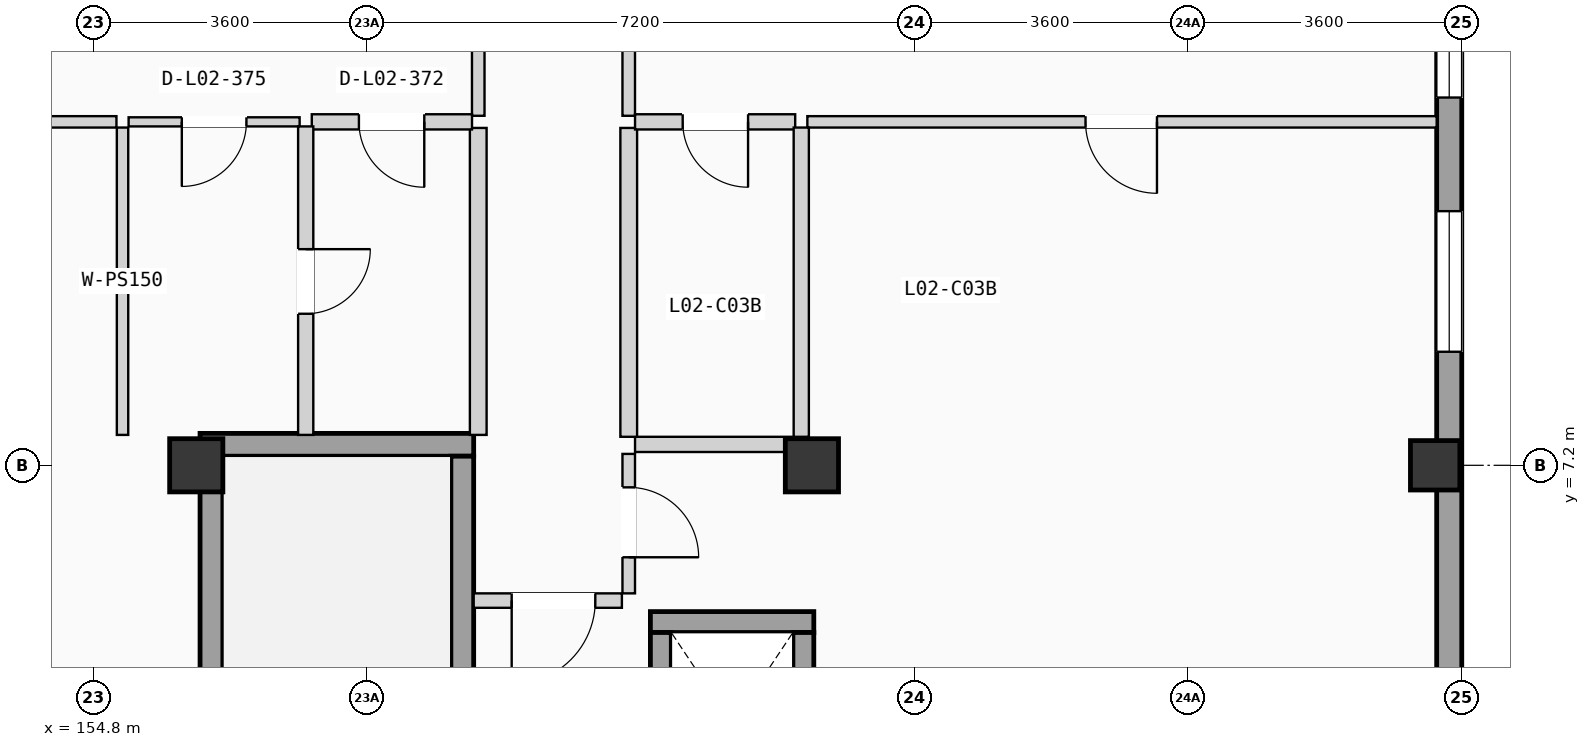
"""IFC4 building model, lengths in metres.
Left out: names, types, materials, properties, quantities, classifications, styles, units other than length and angle.
Written with IfcOpenShell. Run it as: python <this file> out.ifc"""

import sys

from ifc_helpers import new_model, si_unit, direction, frame, frame_2d, origin, origin_2d, place, context, subcontext, project, spatial, rectangle, extrude, element, fill, save


model = new_model("IFC4")
c1 = context("Model", 3, precision=1e-05, world=origin(), true_north=direction((0.0, 1.0)))
c2 = subcontext(c1, "Body", "Model", "MODEL_VIEW")
j1 = project(units=[si_unit("LENGTHUNIT", "METRE"), si_unit("PLANEANGLEUNIT", "RADIAN")], contexts=[c1])
p1 = place(None, origin())
s1 = spatial("IfcSite", under=j1, at=p1, CompositionType="ELEMENT")
p2 = place(p1, origin())
s2 = spatial("IfcBuilding", under=s1, at=p2, CompositionType="ELEMENT")
p3 = place(p2, frame((0.0, 0.0, 8.575)))
s3 = spatial("IfcBuildingStorey", under=s2, at=p3, CompositionType="ELEMENT", Elevation=8.575)
for number, where, z_axis, x_axis in (
    (1, (156.15, 7.2, 0.0), (0.0, 0.0, 1.0), (1.0, 0.0, 0.0)),
    (2, (164.25, 7.2, 0.0), (0.0, 0.0, 1.0), (1.0, 0.0, 0.0)),
):
    element("IfcColumn", number, at=place(p3, frame(where, z_axis=z_axis, x_axis=x_axis)), inside=s3, PredefinedType="COLUMN", context=c2, shape_type="SweptSolid", body=[
        extrude(rectangle(XDim=0.7, YDim=0.7, at=origin_2d()), origin(), (0.0, 0.0, 1.0), 3.5),
    ])
p4 = place(p3, frame((172.45, 7.2, 0.0), z_axis=(0.0, 0.0, 1.0), x_axis=(1.0, 0.0, 0.0)))
e3 = element("IfcColumn", 3, at=p4, inside=s3, PredefinedType="COLUMN", context=c2, shape_type="SweptSolid", body=[
    extrude(rectangle(XDim=0.65, YDim=0.65, at=origin_2d()), origin(), (0.0, 0.0, 1.0), 3.5),
])
p5 = place(p3, frame((172.635, 0.33, 0.0), z_axis=(0.0, 0.0, 1.0), x_axis=(0.0, 1.0, 0.0)))
e4 = element("IfcWall", 4, at=p5, inside=s3, PredefinedType="SOLIDWALL", context=c2, shape_type="SweptSolid", body=[
    extrude(rectangle(XDim=49.74, YDim=0.33, at=frame_2d((24.87, 0.0))), origin(), (0.0, 0.0, 1.0), 3.24),
])
p6 = place(p5, frame((11.709, 0.0, 0.9)))
e5 = element("IfcOpeningElement", 5, at=p6, cuts=e4, PredefinedType="OPENING", context=c2, shape_type="SweptSolid", body=[
    extrude(rectangle(XDim=1.85, YDim=1.2, at=frame_2d((0.925, 0.6))), frame((0.0, 0.175, 0.0), z_axis=(0.0, -1.0, 0.0), x_axis=(1.0, 0.0, 0.0)), (0.0, 0.0, 1.0), 0.35),
])
p7 = place(p5, frame((8.364, 0.0, 0.9)))
e6 = element("IfcOpeningElement", 6, at=p7, cuts=e4, PredefinedType="OPENING", context=c2, shape_type="SweptSolid", body=[
    extrude(rectangle(XDim=1.85, YDim=1.35, at=frame_2d((0.925, 0.675))), frame((0.0, 0.175, 0.0), z_axis=(0.0, -1.0, 0.0), x_axis=(1.0, 0.0, 0.0)), (0.0, 0.0, 1.0), 0.35),
])
p8 = place(p5, frame((17.612, 0.0, 0.9)))
e7 = element("IfcOpeningElement", 7, at=p8, cuts=e4, PredefinedType="OPENING", context=c2, shape_type="SweptSolid", body=[
    extrude(rectangle(XDim=1.85, YDim=1.5, at=frame_2d((0.925, 0.75))), frame((0.0, 0.175, 0.0), z_axis=(0.0, -1.0, 0.0), x_axis=(1.0, 0.0, 0.0)), (0.0, 0.0, 1.0), 0.35),
])
p9 = place(p5, frame((31.145, 0.0, 0.9)))
e8 = element("IfcOpeningElement", 8, at=p9, cuts=e4, PredefinedType="OPENING", context=c2, shape_type="SweptSolid", body=[
    extrude(rectangle(XDim=1.85, YDim=1.65, at=frame_2d((0.925, 0.825))), frame((0.0, 0.175, 0.0), z_axis=(0.0, -1.0, 0.0), x_axis=(1.0, 0.0, 0.0)), (0.0, 0.0, 1.0), 0.35),
])
p10 = place(p5, frame((23.945, 0.0, 0.755)))
e9 = element("IfcOpeningElement", 9, at=p10, cuts=e4, PredefinedType="OPENING", context=c2, shape_type="SweptSolid", body=[
    extrude(rectangle(XDim=1.85, YDim=1.8, at=frame_2d((0.925, 0.9))), frame((0.0, 0.175, 0.0), z_axis=(0.0, -1.0, 0.0), x_axis=(1.0, 0.0, 0.0)), (0.0, 0.0, 1.0), 0.35),
])
p11 = place(p5, frame((38.205, 0.0, 0.9)))
e10 = element("IfcOpeningElement", 10, at=p11, cuts=e4, PredefinedType="OPENING", context=c2, shape_type="SweptSolid", body=[
    extrude(rectangle(XDim=2.0, YDim=1.2, at=frame_2d((1.0, 0.6))), frame((0.0, 0.175, 0.0), z_axis=(0.0, -1.0, 0.0), x_axis=(1.0, 0.0, 0.0)), (0.0, 0.0, 1.0), 0.35),
])
p12 = place(p3, frame((156.2, 7.47, 0.0), z_axis=(0.0, 0.0, 1.0), x_axis=(1.0, 0.0, 0.0)))
e11 = element("IfcWall", 11, at=p12, inside=s3, PredefinedType="SHEAR", context=c2, shape_type="SweptSolid", body=[
    extrude(rectangle(XDim=3.6, YDim=0.3, at=frame_2d((1.8, 0.0))), origin(), (0.0, 0.0, 1.0), 3.24),
])
p13 = place(p3, frame((156.35, 0.32, 0.0), z_axis=(0.0, 0.0, 1.0), x_axis=(0.0, 1.0, 0.0)))
e12 = element("IfcWall", 12, at=p13, inside=s3, PredefinedType="SHEAR", context=c2, shape_type="SweptSolid", body=[
    extrude(rectangle(XDim=7.0, YDim=0.3, at=frame_2d((3.5, 0.0))), origin(), (0.0, 0.0, 1.0), 3.24),
])
p14 = place(p3, frame((159.65, 0.32, 0.0), z_axis=(0.0, 0.0, 1.0), x_axis=(0.0, 1.0, 0.0)))
e13 = element("IfcWall", 13, at=p14, inside=s3, PredefinedType="SHEAR", context=c2, shape_type="SweptSolid", body=[
    extrude(rectangle(XDim=7.0, YDim=0.3, at=frame_2d((3.5, 0.0))), origin(), (0.0, 0.0, 1.0), 3.24),
])
p15 = place(p14, frame((0.225, 0.0, 0.0)))
e14 = element("IfcOpeningElement", 14, at=p15, cuts=e13, PredefinedType="OPENING", context=c2, shape_type="SweptSolid", body=[
    extrude(rectangle(XDim=1.15, YDim=2.12, at=frame_2d((0.575, 1.06))), frame((0.0, 0.16, 0.0), z_axis=(0.0, -1.0, 0.0), x_axis=(1.0, 0.0, 0.0)), (0.0, 0.0, 1.0), 0.32),
])
p16 = place(p3, frame((162.125, 5.137, 0.0), z_axis=(0.0, 0.0, 1.0), x_axis=(1.0, 0.0, 0.0)))
e15 = element("IfcWall", 15, at=p16, inside=s3, PredefinedType="SHEAR", context=c2, shape_type="SweptSolid", body=[
    extrude(rectangle(XDim=2.15, YDim=0.275, at=frame_2d((1.075, 0.0))), origin(), (0.0, 0.0, 1.0), 3.24),
])
p17 = place(p3, frame((162.262, 2.6, 0.0), z_axis=(0.0, 0.0, 1.0), x_axis=(0.0, 1.0, 0.0)))
e16 = element("IfcWall", 16, at=p17, inside=s3, PredefinedType="SHEAR", context=c2, shape_type="SweptSolid", body=[
    extrude(rectangle(XDim=2.4, YDim=0.275, at=frame_2d((1.2, 0.0))), origin(), (0.0, 0.0, 1.0), 3.24),
])
p18 = place(p17, frame((0.65, 0.0, 0.0)))
e17 = element("IfcOpeningElement", 17, at=p18, cuts=e16, PredefinedType="OPENING", context=c2, shape_type="SweptSolid", body=[
    extrude(rectangle(XDim=1.1, YDim=2.15, at=frame_2d((0.55, 1.075))), frame((0.0, 0.147, 0.0), z_axis=(0.0, -1.0, 0.0), x_axis=(1.0, 0.0, 0.0)), (0.0, 0.0, 1.0), 0.295),
])
p19 = place(p3, frame((164.137, 2.6, 0.0), z_axis=(0.0, 0.0, 1.0), x_axis=(0.0, 1.0, 0.0)))
e18 = element("IfcWall", 18, at=p19, inside=s3, PredefinedType="SHEAR", context=c2, shape_type="SweptSolid", body=[
    extrude(rectangle(XDim=2.4, YDim=0.275, at=frame_2d((1.2, 0.0))), origin(), (0.0, 0.0, 1.0), 3.24),
])
p20 = place(p3, frame((159.8, 5.42, 0.0), z_axis=(0.0, 0.0, 1.0), x_axis=(1.0, 0.0, 0.0)))
e19 = element("IfcWall", 19, at=p20, inside=s3, PredefinedType="PARTITIONING", context=c2, shape_type="SweptSolid", body=[
    extrude(rectangle(XDim=1.95, YDim=0.19, at=frame_2d((0.975, 0.0))), origin(), (0.0, 0.0, 1.0), 3.22),
])
p21 = place(p20, frame((0.5, 0.0, 0.0)))
e20 = element("IfcOpeningElement", 20, at=p21, cuts=e19, PredefinedType="OPENING", context=c2, shape_type="SweptSolid", body=[
    extrude(rectangle(XDim=1.1, YDim=2.12, at=frame_2d((0.55, 1.06))), frame((0.0, 0.105, 0.0), z_axis=(0.0, -1.0, 0.0), x_axis=(1.0, 0.0, 0.0)), (0.0, 0.0, 1.0), 0.21),
])
p22 = place(p3, frame((161.84, 5.515, 0.0), z_axis=(0.0, 0.0, 1.0), x_axis=(0.0, 1.0, 0.0)))
e21 = element("IfcWall", 21, at=p22, inside=s3, PredefinedType="PARTITIONING", context=c2, shape_type="SweptSolid", body=[
    extrude(rectangle(XDim=1.835, YDim=0.165, at=frame_2d((0.917, 0.0))), origin(), (0.0, 0.0, 1.0), 3.22),
])
p23 = place(p22, frame((0.475, 0.0, 0.0)))
e22 = element("IfcOpeningElement", 22, at=p23, cuts=e21, PredefinedType="OPENING", context=c2, shape_type="SweptSolid", body=[
    extrude(rectangle(XDim=0.92, YDim=2.04, at=frame_2d((0.46, 1.02))), frame((0.0, 0.093, 0.0), z_axis=(0.0, -1.0, 0.0), x_axis=(1.0, 0.0, 0.0)), (0.0, 0.0, 1.0), 0.185),
])
p24 = place(p3, frame((161.923, 7.475, 0.0), z_axis=(0.0, 0.0, 1.0), x_axis=(1.0, 0.0, 0.0)))
e23 = element("IfcWall", 23, at=p24, inside=s3, PredefinedType="PLUMBINGWALL", context=c2, shape_type="SweptSolid", body=[
    extrude(rectangle(XDim=2.107, YDim=0.2, at=frame_2d((1.053, 0.0))), origin(), (0.0, 0.0, 1.0), 3.22),
])
p25 = place(p3, frame((159.86, 11.799, 0.0), z_axis=(0.0, 0.0, 1.0), x_axis=(0.0, 1.0, 0.0)))
e24 = element("IfcWall", 24, at=p25, inside=s3, PredefinedType="PARTITIONING", context=c2, shape_type="SweptSolid", body=[
    extrude(rectangle(XDim=4.888, YDim=0.165, at=frame_2d((2.444, 0.0))), origin(), (0.0, 0.0, 1.0), 3.22),
])
p26 = place(p25, frame((1.919, 0.0, 0.0)))
e25 = element("IfcOpeningElement", 25, at=p26, cuts=e24, PredefinedType="OPENING", context=c2, shape_type="SweptSolid", body=[
    extrude(rectangle(XDim=1.05, YDim=2.13, at=frame_2d((0.525, 1.065))), frame((0.0, 0.093, 0.0), z_axis=(0.0, -1.0, 0.0), x_axis=(1.0, 0.0, 0.0)), (0.0, 0.0, 1.0), 0.185),
])
p27 = place(p3, frame((159.86, 7.6, 0.0), z_axis=(0.0, 0.0, 1.0), x_axis=(0.0, 1.0, 0.0)))
e26 = element("IfcWall", 26, at=p27, inside=s3, PredefinedType="PLUMBINGWALL", context=c2, shape_type="SweptSolid", body=[
    extrude(rectangle(XDim=4.039, YDim=0.22, at=frame_2d((2.02, 0.0))), origin(), (0.0, 0.0, 1.0), 3.22),
])
p28 = place(p3, frame((161.84, 11.799, 0.0), z_axis=(0.0, 0.0, 1.0), x_axis=(0.0, 1.0, 0.0)))
e27 = element("IfcWall", 27, at=p28, inside=s3, PredefinedType="PARTITIONING", context=c2, shape_type="SweptSolid", body=[
    extrude(rectangle(XDim=4.888, YDim=0.165, at=frame_2d((2.444, 0.0))), origin(), (0.0, 0.0, 1.0), 3.22),
])
p29 = place(p28, frame((1.919, 0.0, 0.0)))
e28 = element("IfcOpeningElement", 28, at=p29, cuts=e27, PredefinedType="OPENING", context=c2, shape_type="SweptSolid", body=[
    extrude(rectangle(XDim=1.05, YDim=2.13, at=frame_2d((0.525, 1.065))), frame((0.0, 0.093, 0.0), z_axis=(0.0, -1.0, 0.0), x_axis=(1.0, 0.0, 0.0)), (0.0, 0.0, 1.0), 0.185),
])
p30 = place(p3, frame((161.84, 7.575, 0.0), z_axis=(0.0, 0.0, 1.0), x_axis=(0.0, 1.0, 0.0)))
e29 = element("IfcWall", 29, at=p30, inside=s3, PredefinedType="PLUMBINGWALL", context=c2, shape_type="SweptSolid", body=[
    extrude(rectangle(XDim=4.064, YDim=0.22, at=frame_2d((2.032, 0.0))), origin(), (0.0, 0.0, 1.0), 3.22),
])
p31 = place(p3, frame((157.67, 11.719, 0.0), z_axis=(0.0, 0.0, 1.0), x_axis=(1.0, 0.0, 0.0)))
e30 = element("IfcWall", 30, at=p31, inside=s3, PredefinedType="PLUMBINGWALL", context=c2, shape_type="SweptSolid", body=[
    extrude(rectangle(XDim=2.108, YDim=0.2, at=frame_2d((1.054, 0.0))), origin(), (0.0, 0.0, 1.0), 3.22),
])
p32 = place(p31, frame((0.62, 0.0, 0.0)))
e31 = element("IfcOpeningElement", 31, at=p32, cuts=e30, PredefinedType="OPENING", context=c2, shape_type="SweptSolid", body=[
    extrude(rectangle(XDim=0.86, YDim=2.0, at=frame_2d((0.43, 1.0))), frame((0.0, 0.11, 0.0), z_axis=(0.0, -1.0, 0.0), x_axis=(1.0, 0.0, 0.0)), (0.0, 0.0, 1.0), 0.22),
])
p33 = place(p3, frame((147.93, 11.719, 0.0), z_axis=(0.0, 0.0, 1.0), x_axis=(1.0, 0.0, 0.0)))
e32 = element("IfcWall", 32, at=p33, inside=s3, PredefinedType="PARTITIONING", context=c2, shape_type="SweptSolid", body=[
    extrude(rectangle(XDim=7.17, YDim=0.15, at=frame_2d((3.585, 0.0))), origin(), (0.0, 0.0, 1.0), 3.22),
])
p34 = place(p33, frame((3.075, 0.0, 0.0)))
e33 = element("IfcOpeningElement", 33, at=p34, cuts=e32, PredefinedType="OPENING", context=c2, shape_type="SweptSolid", body=[
    extrude(rectangle(XDim=1.04, YDim=2.08, at=frame_2d((0.52, 1.04))), frame((0.0, 0.085, 0.0), z_axis=(0.0, -1.0, 0.0), x_axis=(1.0, 0.0, 0.0)), (0.0, 0.0, 1.0), 0.17),
])
p35 = place(p3, frame((155.26, 11.719, 0.0), z_axis=(0.0, 0.0, 1.0), x_axis=(1.0, 0.0, 0.0)))
e34 = element("IfcWall", 34, at=p35, inside=s3, PredefinedType="PARTITIONING", context=c2, shape_type="SweptSolid", body=[
    extrude(rectangle(XDim=2.25, YDim=0.12, at=frame_2d((1.125, 0.0))), origin(), (0.0, 0.0, 1.0), 3.22),
])
p36 = place(p35, frame((0.7, 0.0, 0.0)))
e35 = element("IfcOpeningElement", 35, at=p36, cuts=e34, PredefinedType="OPENING", context=c2, shape_type="SweptSolid", body=[
    extrude(rectangle(XDim=0.85, YDim=2.01, at=frame_2d((0.425, 1.005))), frame((0.0, 0.07, 0.0), z_axis=(0.0, -1.0, 0.0), x_axis=(1.0, 0.0, 0.0)), (0.0, 0.0, 1.0), 0.14),
])
p37 = place(p3, frame((157.59, 7.6, 0.0), z_axis=(0.0, 0.0, 1.0), x_axis=(0.0, 1.0, 0.0)))
e36 = element("IfcWall", 36, at=p37, inside=s3, PredefinedType="PLUMBINGWALL", context=c2, shape_type="SweptSolid", body=[
    extrude(rectangle(XDim=4.059, YDim=0.2, at=frame_2d((2.029, 0.0))), origin(), (0.0, 0.0, 1.0), 3.22),
])
p38 = place(p37, frame((1.594, 0.0, 0.0)))
e37 = element("IfcOpeningElement", 37, at=p38, cuts=e36, PredefinedType="OPENING", context=c2, shape_type="SweptSolid", body=[
    extrude(rectangle(XDim=0.85, YDim=2.01, at=frame_2d((0.425, 1.005))), frame((0.0, 0.11, 0.0), z_axis=(0.0, -1.0, 0.0), x_axis=(1.0, 0.0, 0.0)), (0.0, 0.0, 1.0), 0.22),
])
p39 = place(p3, frame((155.18, 7.6, 0.0), z_axis=(0.0, 0.0, 1.0), x_axis=(0.0, 1.0, 0.0)))
e38 = element("IfcWall", 38, at=p39, inside=s3, PredefinedType="PARTITIONING", context=c2, shape_type="SweptSolid", body=[
    extrude(rectangle(XDim=4.044, YDim=0.15, at=frame_2d((2.022, 0.0))), origin(), (0.0, 0.0, 1.0), 3.22),
])
p40 = place(p3, frame((161.923, 11.719, 0.0), z_axis=(0.0, 0.0, 1.0), x_axis=(1.0, 0.0, 0.0)))
e39 = element("IfcWall", 39, at=p40, inside=s3, PredefinedType="PLUMBINGWALL", context=c2, shape_type="SweptSolid", body=[
    extrude(rectangle(XDim=2.107, YDim=0.2, at=frame_2d((1.053, 0.0))), origin(), (0.0, 0.0, 1.0), 3.22),
])
p41 = place(p40, frame((0.627, 0.0, 0.0)))
e40 = element("IfcOpeningElement", 40, at=p41, cuts=e39, PredefinedType="OPENING", context=c2, shape_type="SweptSolid", body=[
    extrude(rectangle(XDim=0.86, YDim=2.0, at=frame_2d((0.43, 1.0))), frame((0.0, 0.11, 0.0), z_axis=(0.0, -1.0, 0.0), x_axis=(1.0, 0.0, 0.0)), (0.0, 0.0, 1.0), 0.22),
])
p42 = place(p3, frame((164.19, 11.719, 0.0), z_axis=(0.0, 0.0, 1.0), x_axis=(1.0, 0.0, 0.0)))
e41 = element("IfcWall", 41, at=p42, inside=s3, PredefinedType="PARTITIONING", context=c2, shape_type="SweptSolid", body=[
    extrude(rectangle(XDim=8.28, YDim=0.15, at=frame_2d((4.14, 0.0))), origin(), (0.0, 0.0, 1.0), 3.22),
])
p43 = place(p42, frame((3.66, 0.0, 0.0)))
e42 = element("IfcOpeningElement", 42, at=p43, cuts=e41, PredefinedType="OPENING", context=c2, shape_type="SweptSolid", body=[
    extrude(rectangle(XDim=0.94, YDim=2.06, at=frame_2d((0.47, 1.03))), frame((0.0, 0.085, 0.0), z_axis=(0.0, -1.0, 0.0), x_axis=(1.0, 0.0, 0.0)), (0.0, 0.0, 1.0), 0.17),
])
p44 = place(p3, frame((164.11, 7.575, 0.0), z_axis=(0.0, 0.0, 1.0), x_axis=(0.0, 1.0, 0.0)))
e43 = element("IfcWall", 43, at=p44, inside=s3, PredefinedType="PLUMBINGWALL", context=c2, shape_type="SweptSolid", body=[
    extrude(rectangle(XDim=4.069, YDim=0.2, at=frame_2d((2.035, 0.0))), origin(), (0.0, 0.0, 1.0), 3.22),
])
p45 = place(p6, origin())
e44 = element("IfcWindow", 44, at=p45, inside=s3, PartitioningType="DOUBLE_PANEL_VERTICAL", PredefinedType="WINDOW", context=c2, shape_type="SweptSolid", body=[
    extrude(rectangle(XDim=1.85, YDim=1.2, at=frame_2d((0.925, 0.6))), frame((0.0, 0.03, 0.0), z_axis=(0.0, -1.0, 0.0), x_axis=(1.0, 0.0, 0.0)), (0.0, 0.0, 1.0), 0.06),
])
fill(e5, e44)
p46 = place(p7, origin())
e45 = element("IfcWindow", 45, at=p46, inside=s3, PartitioningType="DOUBLE_PANEL_VERTICAL", PredefinedType="WINDOW", context=c2, shape_type="SweptSolid", body=[
    extrude(rectangle(XDim=1.85, YDim=1.35, at=frame_2d((0.925, 0.675))), frame((0.0, 0.03, 0.0), z_axis=(0.0, -1.0, 0.0), x_axis=(1.0, 0.0, 0.0)), (0.0, 0.0, 1.0), 0.06),
])
fill(e6, e45)
p47 = place(p21, frame((1.1, 0.0, 0.0), z_axis=(0.0, 0.0, 1.0), x_axis=(-1.0, 0.0, 0.0)))
e46 = element("IfcDoor", 46, at=p47, inside=s3, OperationType="SINGLE_SWING_LEFT", PredefinedType="DOOR", context=c2, shape_type="SweptSolid", body=[
    extrude(rectangle(XDim=1.1, YDim=2.12, at=frame_2d((0.55, 1.06))), frame((0.0, 0.025, 0.0), z_axis=(0.0, -1.0, 0.0), x_axis=(1.0, 0.0, 0.0)), (0.0, 0.0, 1.0), 0.05),
])
fill(e20, e46)
p48 = place(p23, frame((0.92, 0.0, 0.0), z_axis=(0.0, 0.0, 1.0), x_axis=(-1.0, 0.0, 0.0)))
e47 = element("IfcDoor", 47, at=p48, inside=s3, OperationType="SINGLE_SWING_LEFT", PredefinedType="DOOR", context=c2, shape_type="SweptSolid", body=[
    extrude(rectangle(XDim=0.92, YDim=2.04, at=frame_2d((0.46, 1.02))), frame((0.0, 0.025, 0.0), z_axis=(0.0, -1.0, 0.0), x_axis=(1.0, 0.0, 0.0)), (0.0, 0.0, 1.0), 0.05),
])
fill(e22, e47)
p49 = place(p32, frame((0.86, 0.0, 0.0), z_axis=(0.0, 0.0, 1.0), x_axis=(-1.0, 0.0, 0.0)))
e48 = element("IfcDoor", 48, at=p49, inside=s3, OperationType="SINGLE_SWING_RIGHT", PredefinedType="DOOR", context=c2, shape_type="SweptSolid", body=[
    extrude(rectangle(XDim=0.86, YDim=2.0, at=frame_2d((0.43, 1.0))), frame((0.0, 0.025, 0.0), z_axis=(0.0, -1.0, 0.0), x_axis=(1.0, 0.0, 0.0)), (0.0, 0.0, 1.0), 0.05),
])
fill(e31, e48)
p50 = place(p36, frame((0.85, 0.0, 0.0), z_axis=(0.0, 0.0, 1.0), x_axis=(-1.0, 0.0, 0.0)))
e49 = element("IfcDoor", 49, at=p50, inside=s3, OperationType="SINGLE_SWING_LEFT", PredefinedType="DOOR", context=c2, shape_type="SweptSolid", body=[
    extrude(rectangle(XDim=0.85, YDim=2.01, at=frame_2d((0.425, 1.005))), frame((0.0, 0.025, 0.0), z_axis=(0.0, -1.0, 0.0), x_axis=(1.0, 0.0, 0.0)), (0.0, 0.0, 1.0), 0.05),
])
fill(e35, e49)
p51 = place(p38, frame((0.85, 0.0, 0.0), z_axis=(0.0, 0.0, 1.0), x_axis=(-1.0, 0.0, 0.0)))
e50 = element("IfcDoor", 50, at=p51, inside=s3, OperationType="SINGLE_SWING_RIGHT", PredefinedType="DOOR", context=c2, shape_type="SweptSolid", body=[
    extrude(rectangle(XDim=0.85, YDim=2.01, at=frame_2d((0.425, 1.005))), frame((0.0, 0.025, 0.0), z_axis=(0.0, -1.0, 0.0), x_axis=(1.0, 0.0, 0.0)), (0.0, 0.0, 1.0), 0.05),
])
fill(e37, e50)
p52 = place(p41, frame((0.86, 0.0, 0.0), z_axis=(0.0, 0.0, 1.0), x_axis=(-1.0, 0.0, 0.0)))
e51 = element("IfcDoor", 51, at=p52, inside=s3, OperationType="SINGLE_SWING_RIGHT", PredefinedType="DOOR", context=c2, shape_type="SweptSolid", body=[
    extrude(rectangle(XDim=0.86, YDim=2.0, at=frame_2d((0.43, 1.0))), frame((0.0, 0.025, 0.0), z_axis=(0.0, -1.0, 0.0), x_axis=(1.0, 0.0, 0.0)), (0.0, 0.0, 1.0), 0.05),
])
fill(e40, e51)
p53 = place(p43, frame((0.94, 0.0, 0.0), z_axis=(0.0, 0.0, 1.0), x_axis=(-1.0, 0.0, 0.0)))
e52 = element("IfcDoor", 52, at=p53, inside=s3, OperationType="SINGLE_SWING_RIGHT", PredefinedType="DOOR", context=c2, shape_type="SweptSolid", body=[
    extrude(rectangle(XDim=0.94, YDim=2.06, at=frame_2d((0.47, 1.03))), frame((0.0, 0.025, 0.0), z_axis=(0.0, -1.0, 0.0), x_axis=(1.0, 0.0, 0.0)), (0.0, 0.0, 1.0), 0.05),
])
fill(e42, e52)
save(model, sys.argv[1])
